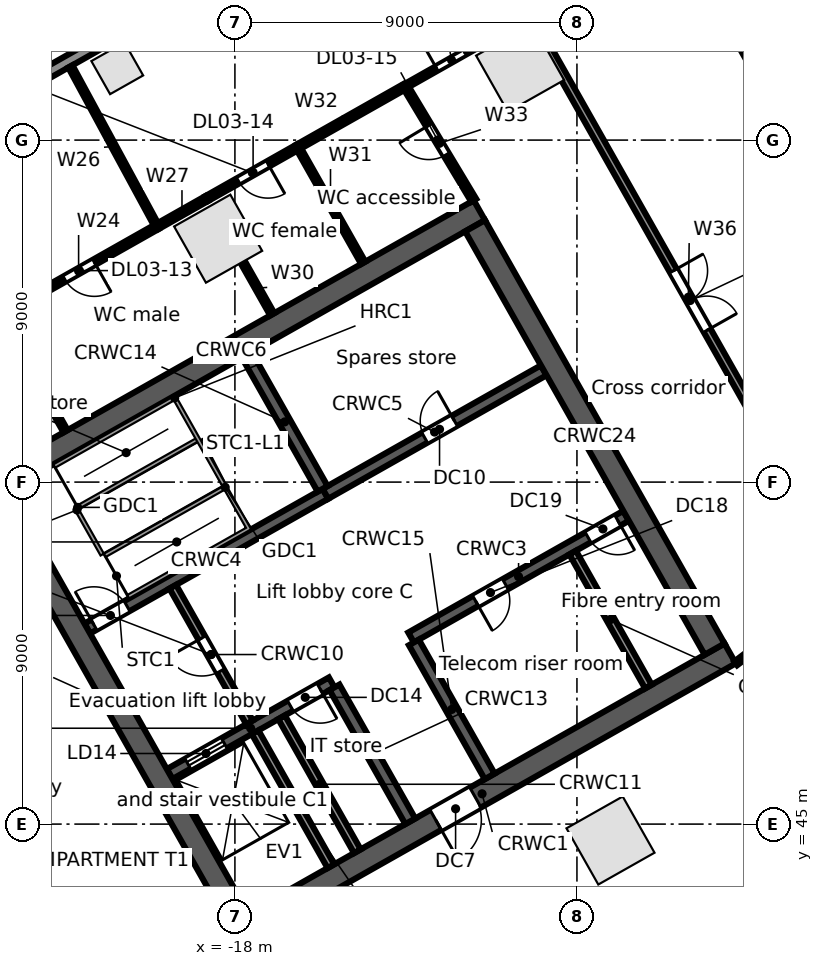
"""IFC4 building model, lengths in metres.
Left out: names, types, materials, properties, quantities, classifications, styles, units other than length and angle.
Written with IfcOpenShell. Run it as: python <this file> out.ifc"""

import sys

from ifc_helpers import new_model, si_unit, direction, frame, frame_2d, origin, origin_2d, place, context, subcontext, project, spatial, rectangle, extrude, element, fill, save


model = new_model("IFC4")
c1 = context("Model", 3, precision=1e-05, world=origin(), true_north=direction((0.0, 1.0)))
c2 = subcontext(c1, "Body", "Model", "MODEL_VIEW")
j1 = project(units=[si_unit("LENGTHUNIT", "METRE"), si_unit("PLANEANGLEUNIT", "RADIAN")], contexts=[c1])
p1 = place(None, origin())
s1 = spatial("IfcSite", under=j1, at=p1, CompositionType="ELEMENT")
p2 = place(p1, origin())
s2 = spatial("IfcBuilding", under=s1, at=p2, CompositionType="ELEMENT")
p3 = place(p2, frame((0.0, 0.0, 16.5)))
s3 = spatial("IfcBuildingStorey", under=s2, at=p3, CompositionType="ELEMENT", Elevation=16.5)
for number, where, z_axis, x_axis in (
    (1, (-10.495, 64.902, 0.0), (0.0, 0.0, 1.0), (-0.87, -0.492, 0.0)),
    (2, (-18.441, 60.406, 0.0), (0.0, 0.0, 1.0), (-0.87, -0.492, 0.0)),
    (3, (-8.117, 44.568, 0.0), (0.0, 0.0, 1.0), (0.87, 0.492, 0.0)),
):
    element("IfcColumn", number, at=place(p3, frame(where, z_axis=z_axis, x_axis=x_axis)), inside=s3, PredefinedType="COLUMN", context=c2, shape_type="SweptSolid", body=[
        extrude(rectangle(XDim=1.7, YDim=1.7, at=origin_2d()), origin(), (0.0, 0.0, 1.0), 5.0),
    ])
p4 = place(p3, frame((-21.096, 64.89, 0.0), z_axis=(0.0, 0.0, 1.0), x_axis=(-0.87035569594, -0.492423560103, 0.0)))
e4 = element("IfcColumn", 4, at=p4, inside=s3, PredefinedType="COLUMN", context=c2, shape_type="SweptSolid", body=[
    extrude(rectangle(XDim=1.0, YDim=1.0, at=origin_2d()), origin(), (0.0, 0.0, 1.0), 5.0),
])
p5 = place(p3, frame((-63.707, 41.701, 0.0), z_axis=(0.0, 0.0, 1.0), x_axis=(0.870355510268, 0.492423888277, 0.0)))
e5 = element("IfcWall", 5, at=p5, inside=s3, PredefinedType="STANDARD", context=c2, shape_type="SweptSolid", body=[
    extrude(rectangle(XDim=67.903, YDim=0.3, at=frame_2d((33.952, 0.0))), origin(), (0.0, 0.0, 1.0), 4.65),
])
p6 = place(p3, frame((-18.024, 42.104, 0.0), z_axis=(0.0, 0.0, 1.0), x_axis=(0.870360574057, 0.492414937962, 0.0)))
e6 = element("IfcWall", 6, at=p6, inside=s3, PredefinedType="SOLIDWALL", context=c2, shape_type="SweptSolid", body=[
    extrude(rectangle(XDim=15.0, YDim=0.6, at=frame_2d((7.5, 0.0))), origin(), (0.0, 0.0, 1.0), 4.65),
])
p7 = place(p6, frame((6.1, 0.0, 0.0)))
e7 = element("IfcOpeningElement", 7, at=p7, cuts=e6, PredefinedType="OPENING", context=c2, shape_type="SweptSolid", body=[
    extrude(rectangle(XDim=1.2, YDim=2.1, at=frame_2d((0.6, 1.05))), frame((0.0, 0.31, 0.0), z_axis=(0.0, -1.0, 0.0), x_axis=(1.0, 0.0, 0.0)), (0.0, 0.0, 1.0), 0.62),
])
p8 = place(p3, frame((-19.718, 46.316, 0.0), z_axis=(0.0, 0.0, 1.0), x_axis=(0.870353963862, 0.492426621528, 0.0)))
e8 = element("IfcWall", 8, at=p8, inside=s3, PredefinedType="SOLIDWALL", context=c2, shape_type="SweptSolid", body=[
    extrude(rectangle(XDim=4.9, YDim=0.3, at=frame_2d((2.45, 0.0))), origin(), (0.0, 0.0, 1.0), 4.65),
])
p9 = place(p8, frame((0.55, 0.0, 0.0)))
e9 = element("IfcOpeningElement", 9, at=p9, cuts=e8, PredefinedType="OPENING", context=c2, shape_type="SweptSolid", body=[
    extrude(rectangle(XDim=1.1, YDim=2.1, at=frame_2d((0.55, 1.05))), frame((0.0, 0.16, 0.0), z_axis=(0.0, -1.0, 0.0), x_axis=(1.0, 0.0, 0.0)), (0.0, 0.0, 1.0), 0.32),
])
p10 = place(p8, frame((3.65, 0.0, 0.0)))
e10 = element("IfcOpeningElement", 10, at=p10, cuts=e8, PredefinedType="OPENING", context=c2, shape_type="SweptSolid", body=[
    extrude(rectangle(XDim=0.9, YDim=2.1, at=frame_2d((0.45, 1.05))), frame((0.0, 0.16, 0.0), z_axis=(0.0, -1.0, 0.0), x_axis=(1.0, 0.0, 0.0)), (0.0, 0.0, 1.0), 0.32),
])
p11 = place(p3, frame((-13.365, 49.911, 0.0), z_axis=(0.0, 0.0, 1.0), x_axis=(0.870340995471, 0.49244954219, 0.0)))
e11 = element("IfcWall", 11, at=p11, inside=s3, PredefinedType="SOLIDWALL", context=c2, shape_type="SweptSolid", body=[
    extrude(rectangle(XDim=6.5, YDim=0.3, at=frame_2d((3.25, 0.0))), origin(), (0.0, 0.0, 1.0), 4.65),
])
p12 = place(p11, frame((1.95, 0.0, 0.0)))
e12 = element("IfcOpeningElement", 12, at=p12, cuts=e11, PredefinedType="OPENING", context=c2, shape_type="SweptSolid", body=[
    extrude(rectangle(XDim=0.9, YDim=2.1, at=frame_2d((0.45, 1.05))), frame((0.0, 0.16, 0.0), z_axis=(0.0, -1.0, 0.0), x_axis=(1.0, 0.0, 0.0)), (0.0, 0.0, 1.0), 0.32),
])
p13 = place(p11, frame((5.35, 0.0, 0.0)))
e13 = element("IfcOpeningElement", 13, at=p13, cuts=e11, PredefinedType="OPENING", context=c2, shape_type="SweptSolid", body=[
    extrude(rectangle(XDim=0.9, YDim=2.1, at=frame_2d((0.45, 1.05))), frame((0.0, 0.16, 0.0), z_axis=(0.0, -1.0, 0.0), x_axis=(1.0, 0.0, 0.0)), (0.0, 0.0, 1.0), 0.32),
])
p14 = place(p3, frame((-21.885, 50.146, 0.0), z_axis=(0.0, 0.0, 1.0), x_axis=(0.870359411463, 0.492416992881, 0.0)))
e14 = element("IfcWall", 14, at=p14, inside=s3, PredefinedType="SOLIDWALL", context=c2, shape_type="SweptSolid", body=[
    extrude(rectangle(XDim=7.2, YDim=0.3, at=frame_2d((3.6, 0.0))), origin(), (0.0, 0.0, 1.0), 4.65),
])
p15 = place(p14, frame((0.2, 0.0, 0.0)))
e15 = element("IfcOpeningElement", 15, at=p15, cuts=e14, PredefinedType="OPENING", context=c2, shape_type="SweptSolid", body=[
    extrude(rectangle(XDim=1.0, YDim=2.1, at=frame_2d((0.5, 1.05))), frame((0.0, 0.16, 0.0), z_axis=(0.0, -1.0, 0.0), x_axis=(1.0, 0.0, 0.0)), (0.0, 0.0, 1.0), 0.32),
])
p16 = place(p3, frame((-15.618, 53.691, 0.0), z_axis=(0.0, 0.0, 1.0), x_axis=(0.870356769198, 0.492421663121, 0.0)))
e16 = element("IfcWall", 16, at=p16, inside=s3, PredefinedType="SOLIDWALL", context=c2, shape_type="SweptSolid", body=[
    extrude(rectangle(XDim=6.6, YDim=0.3, at=frame_2d((3.3, 0.0))), origin(), (0.0, 0.0, 1.0), 4.65),
])
p17 = place(p16, frame((3.0, 0.0, 0.0)))
e17 = element("IfcOpeningElement", 17, at=p17, cuts=e16, PredefinedType="OPENING", context=c2, shape_type="SweptSolid", body=[
    extrude(rectangle(XDim=0.9, YDim=2.1, at=frame_2d((0.45, 1.05))), frame((0.0, 0.16, 0.0), z_axis=(0.0, -1.0, 0.0), x_axis=(1.0, 0.0, 0.0)), (0.0, 0.0, 1.0), 0.32),
])
p18 = place(p3, frame((-24.623, 53.767, 0.0), z_axis=(0.0, 0.0, 1.0), x_axis=(0.870356627484, 0.492421913601, 0.0)))
e18 = element("IfcWall", 18, at=p18, inside=s3, PredefinedType="SOLIDWALL", context=c2, shape_type="SweptSolid", body=[
    extrude(rectangle(XDim=15.0, YDim=0.6, at=frame_2d((7.5, 0.0))), origin(), (0.0, 0.0, 1.0), 4.65),
])
p19 = place(p3, frame((-24.214, 53.654, 0.0), z_axis=(0.0, 0.0, 1.0), x_axis=(0.492441221355, -0.870345703448, 0.0)))
e19 = element("IfcWall", 19, at=p19, inside=s3, PredefinedType="SOLIDWALL", context=c2, shape_type="SweptSolid", body=[
    extrude(rectangle(XDim=12.8, YDim=0.6, at=frame_2d((6.4, 0.0))), origin(), (0.0, 0.0, 1.0), 4.65),
])
p20 = place(p3, frame((-17.469, 47.417, 0.0), z_axis=(0.0, 0.0, 1.0), x_axis=(0.492440575896, -0.870346068648, 0.0)))
e20 = element("IfcWall", 20, at=p20, inside=s3, PredefinedType="SOLIDWALL", context=c2, shape_type="SweptSolid", body=[
    extrude(rectangle(XDim=4.05, YDim=0.2, at=frame_2d((2.025, 0.0))), origin(), (0.0, 0.0, 1.0), 4.65),
])
p21 = place(p3, frame((-19.635, 51.246, 0.0), z_axis=(0.0, 0.0, 1.0), x_axis=(0.492408451753, -0.87036424366, 0.0)))
e21 = element("IfcWall", 21, at=p21, inside=s3, PredefinedType="PARTITIONING", context=c2, shape_type="SweptSolid", body=[
    extrude(rectangle(XDim=4.1, YDim=0.2, at=frame_2d((2.05, 0.0))), origin(), (0.0, 0.0, 1.0), 4.65),
])
p22 = place(p21, frame((1.55, 0.0, 0.0)))
e22 = element("IfcOpeningElement", 22, at=p22, cuts=e21, PredefinedType="OPENING", context=c2, shape_type="SweptSolid", body=[
    extrude(rectangle(XDim=1.0, YDim=2.1, at=frame_2d((0.5, 1.05))), frame((0.0, 0.11, 0.0), z_axis=(0.0, -1.0, 0.0), x_axis=(1.0, 0.0, 0.0)), (0.0, 0.0, 1.0), 0.22),
])
p23 = place(p3, frame((-16.772, 47.811, 0.0), z_axis=(0.0, 0.0, 1.0), x_axis=(0.492440575896, -0.870346068648, 0.0)))
e23 = element("IfcWall", 23, at=p23, inside=s3, PredefinedType="SOLIDWALL", context=c2, shape_type="SweptSolid", body=[
    extrude(rectangle(XDim=4.05, YDim=0.2, at=frame_2d((2.025, 0.0))), origin(), (0.0, 0.0, 1.0), 4.65),
])
p24 = place(p3, frame((-15.379, 48.599, 0.0), z_axis=(0.0, 0.0, 1.0), x_axis=(0.492394910396, -0.870371904542, 0.0)))
e24 = element("IfcWall", 24, at=p24, inside=s3, PredefinedType="SOLIDWALL", context=c2, shape_type="SweptSolid", body=[
    extrude(rectangle(XDim=4.05, YDim=0.3, at=frame_2d((2.025, 0.0))), origin(), (0.0, 0.0, 1.0), 4.65),
])
p25 = place(p3, frame((-17.686, 57.347, 0.0), z_axis=(0.0, 0.0, 1.0), x_axis=(0.492420746998, -0.870357287513, 0.0)))
e25 = element("IfcWall", 25, at=p25, inside=s3, PredefinedType="SOLIDWALL", context=c2, shape_type="SweptSolid", body=[
    extrude(rectangle(XDim=4.05, YDim=0.3, at=frame_2d((2.025, 0.0))), origin(), (0.0, 0.0, 1.0), 4.65),
])
p26 = place(p3, frame((-13.291, 49.781, 0.0), z_axis=(0.0, 0.0, 1.0), x_axis=(0.492394910396, -0.870371904542, 0.0)))
e26 = element("IfcWall", 26, at=p26, inside=s3, PredefinedType="SOLIDWALL", context=c2, shape_type="SweptSolid", body=[
    extrude(rectangle(XDim=4.05, YDim=0.3, at=frame_2d((2.025, 0.0))), origin(), (0.0, 0.0, 1.0), 4.65),
])
p27 = place(p3, frame((-9.113, 52.144, 0.0), z_axis=(0.0, 0.0, 1.0), x_axis=(0.492394910396, -0.870371904542, 0.0)))
e27 = element("IfcWall", 27, at=p27, inside=s3, PredefinedType="PARTITIONING", context=c2, shape_type="SweptSolid", body=[
    extrude(rectangle(XDim=4.05, YDim=0.2, at=frame_2d((2.025, 0.0))), origin(), (0.0, 0.0, 1.0), 4.65),
])
p28 = place(p3, frame((-11.681, 60.744, 0.0), z_axis=(0.0, 0.0, 1.0), x_axis=(0.492426772896, -0.870353878221, 0.0)))
e28 = element("IfcWall", 28, at=p28, inside=s3, PredefinedType="SOLIDWALL", context=c2, shape_type="SweptSolid", body=[
    extrude(rectangle(XDim=12.8, YDim=0.6, at=frame_2d((6.4, 0.0))), origin(), (0.0, 0.0, 1.0), 4.65),
])
p29 = place(p3, frame((-24.18, 58.384, 0.0), z_axis=(0.0, 0.0, 1.0), x_axis=(0.492521469645, -0.870300294116, 0.0)))
e29 = element("IfcWall", 29, at=p29, inside=s3, PredefinedType="PARTITIONING", context=c2, shape_type="SweptSolid", body=[
    extrude(rectangle(XDim=3.5, YDim=0.125, at=frame_2d((1.75, 0.0))), origin(), (0.0, 0.0, 1.0), 3.93),
])
p30 = place(p3, frame((-24.18, 58.384, 0.0), z_axis=(0.0, 0.0, 1.0), x_axis=(0.870360772617, 0.492414587, 0.0)))
e30 = element("IfcWall", 30, at=p30, inside=s3, PredefinedType="PARTITIONING", context=c2, shape_type="SweptSolid", body=[
    extrude(rectangle(XDim=4.75, YDim=0.15, at=frame_2d((2.375, 0.0))), origin(), (0.0, 0.0, 1.0), 4.65),
])
p31 = place(p30, frame((1.95, 0.0, 0.0)))
e31 = element("IfcOpeningElement", 31, at=p31, cuts=e30, PredefinedType="OPENING", context=c2, shape_type="SweptSolid", body=[
    extrude(rectangle(XDim=0.9, YDim=2.1, at=frame_2d((0.45, 1.05))), frame((0.0, 0.085, 0.0), z_axis=(0.0, -1.0, 0.0), x_axis=(1.0, 0.0, 0.0)), (0.0, 0.0, 1.0), 0.17),
])
p32 = place(p3, frame((-22.33, 64.939, 0.0), z_axis=(0.0, 0.0, 1.0), x_axis=(0.476360236723, -0.879250206067, 0.0)))
e32 = element("IfcWall", 32, at=p32, inside=s3, PredefinedType="PARTITIONING", context=c2, shape_type="SweptSolid", body=[
    extrude(rectangle(XDim=4.795, YDim=0.125, at=frame_2d((2.397, 0.0))), origin(), (0.0, 0.0, 1.0), 3.93),
])
p33 = place(p3, frame((-20.046, 60.723, 0.0), z_axis=(0.0, 0.0, 1.0), x_axis=(0.870308175411, 0.492507542899, 0.0)))
e33 = element("IfcWall", 33, at=p33, inside=s3, PredefinedType="PARTITIONING", context=c2, shape_type="SweptSolid", body=[
    extrude(rectangle(XDim=1.5, YDim=0.15, at=frame_2d((0.75, 0.0))), origin(), (0.0, 0.0, 1.0), 3.93),
])
p34 = place(p3, frame((-18.74, 61.462, 0.0), z_axis=(0.0, 0.0, 1.0), x_axis=(0.870430549821, 0.492291232848, 0.0)))
e34 = element("IfcWall", 34, at=p34, inside=s3, PredefinedType="PARTITIONING", context=c2, shape_type="SweptSolid", body=[
    extrude(rectangle(XDim=2.75, YDim=0.15, at=frame_2d((1.375, 0.0))), origin(), (0.0, 0.0, 1.0), 4.65),
])
p35 = place(p34, frame((0.95, 0.0, 0.0)))
e35 = element("IfcOpeningElement", 35, at=p35, cuts=e34, PredefinedType="OPENING", context=c2, shape_type="SweptSolid", body=[
    extrude(rectangle(XDim=0.9, YDim=2.1, at=frame_2d((0.45, 1.05))), frame((0.0, 0.085, 0.0), z_axis=(0.0, -1.0, 0.0), x_axis=(1.0, 0.0, 0.0)), (0.0, 0.0, 1.0), 0.17),
])
p36 = place(p3, frame((-17.797, 59.794, 0.0), z_axis=(0.0, 0.0, 1.0), x_axis=(0.492366981934, -0.870387703901, 0.0)))
e36 = element("IfcWall", 36, at=p36, inside=s3, PredefinedType="PARTITIONING", context=c2, shape_type="SweptSolid", body=[
    extrude(rectangle(XDim=1.584, YDim=0.125, at=frame_2d((0.792, 0.0))), origin(), (0.0, 0.0, 1.0), 4.65),
])
p37 = place(p3, frame((-16.346, 62.816, 0.0), z_axis=(0.0, 0.0, 1.0), x_axis=(0.492220429283, -0.870470590541, 0.0)))
e37 = element("IfcWall", 37, at=p37, inside=s3, PredefinedType="PARTITIONING", context=c2, shape_type="SweptSolid", body=[
    extrude(rectangle(XDim=3.5, YDim=0.125, at=frame_2d((1.75, 0.0))), origin(), (0.0, 0.0, 1.0), 3.93),
])
p38 = place(p3, frame((-16.346, 62.816, 0.0), z_axis=(0.0, 0.0, 1.0), x_axis=(0.870334637055, 0.492460779699, 0.0)))
e38 = element("IfcWall", 38, at=p38, inside=s3, PredefinedType="PARTITIONING", context=c2, shape_type="SweptSolid", body=[
    extrude(rectangle(XDim=3.249, YDim=0.15, at=frame_2d((1.625, 0.0))), origin(), (0.0, 0.0, 1.0), 4.65),
])
p39 = place(p3, frame((-13.518, 64.416, 0.0), z_axis=(0.0, 0.0, 1.0), x_axis=(0.514875058642, -0.857265229663, 0.0)))
e39 = element("IfcWall", 39, at=p39, inside=s3, PredefinedType="PARTITIONING", context=c2, shape_type="SweptSolid", body=[
    extrude(rectangle(XDim=3.502, YDim=0.15, at=frame_2d((1.751, 0.0))), origin(), (0.0, 0.0, 1.0), 3.93),
])
p40 = place(p39, frame((1.2, 0.0, 0.0)))
e40 = element("IfcOpeningElement", 40, at=p40, cuts=e39, PredefinedType="OPENING", context=c2, shape_type="SweptSolid", body=[
    extrude(rectangle(XDim=0.9, YDim=2.1, at=frame_2d((0.45, 1.05))), frame((0.0, 0.085, 0.0), z_axis=(0.0, -1.0, 0.0), x_axis=(1.0, 0.0, 0.0)), (0.0, 0.0, 1.0), 0.17),
])
p41 = place(p3, frame((-13.518, 64.416, 0.0), z_axis=(0.0, 0.0, 1.0), x_axis=(0.870338454914, 0.492454032268, 0.0)))
e41 = element("IfcWall", 41, at=p41, inside=s3, PredefinedType="PARTITIONING", context=c2, shape_type="SweptSolid", body=[
    extrude(rectangle(XDim=3.75, YDim=0.125, at=frame_2d((1.875, 0.0))), origin(), (0.0, 0.0, 1.0), 3.712),
])
p42 = place(p41, frame((0.95, 0.0, 0.0)))
e42 = element("IfcOpeningElement", 42, at=p42, cuts=e41, PredefinedType="OPENING", context=c2, shape_type="SweptSolid", body=[
    extrude(rectangle(XDim=0.9, YDim=2.1, at=frame_2d((0.45, 1.05))), frame((0.0, 0.073, 0.0), z_axis=(0.0, -1.0, 0.0), x_axis=(1.0, 0.0, 0.0)), (0.0, 0.0, 1.0), 0.145),
])
p43 = place(p3, frame((-10.254, 66.263, 0.0), z_axis=(0.0, 0.0, 1.0), x_axis=(0.492411664329, -0.870362426138, 0.0)))
e43 = element("IfcWall", 43, at=p43, inside=s3, PredefinedType="PARTITIONING", context=c2, shape_type="SweptSolid", body=[
    extrude(rectangle(XDim=17.0, YDim=0.2, at=frame_2d((8.5, 0.0))), origin(), (0.0, 0.0, 1.0), 3.712),
])
p44 = place(p43, frame((7.7, 0.0, 0.0)))
e44 = element("IfcOpeningElement", 44, at=p44, cuts=e43, PredefinedType="OPENING", context=c2, shape_type="SweptSolid", body=[
    extrude(rectangle(XDim=1.8, YDim=2.1, at=frame_2d((0.9, 1.05))), frame((0.0, 0.11, 0.0), z_axis=(0.0, -1.0, 0.0), x_axis=(1.0, 0.0, 0.0)), (0.0, 0.0, 1.0), 0.22),
])
p45 = place(p3, frame((-6.337, 68.478, 0.0), z_axis=(0.0, 0.0, 1.0), x_axis=(0.492412602502, -0.870361895361, 0.0)))
e45 = element("IfcWall", 45, at=p45, inside=s3, PredefinedType="PARTITIONING", context=c2, shape_type="SweptSolid", body=[
    extrude(rectangle(XDim=9.417, YDim=0.2, at=frame_2d((4.708, 0.0))), origin(), (0.0, 0.0, 1.0), 3.712),
])
p46 = place(p3, frame((-4.821, 49.23, 0.0), z_axis=(0.0, 0.0, 1.0), x_axis=(0.795615322848, 0.605802160816, 0.0)))
e46 = element("IfcWall", 46, at=p46, inside=s3, PredefinedType="PARTITIONING", context=c2, shape_type="SweptSolid", body=[
    extrude(rectangle(XDim=3.693, YDim=0.125, at=frame_2d((1.846, 0.0))), origin(), (0.0, 0.0, 1.0), 4.65),
])
p47 = place(p46, frame((1.45, 0.0, 0.0)))
e47 = element("IfcOpeningElement", 47, at=p47, cuts=e46, PredefinedType="OPENING", context=c2, shape_type="SweptSolid", body=[
    extrude(rectangle(XDim=0.9, YDim=2.1, at=frame_2d((0.45, 1.05))), frame((0.0, 0.073, 0.0), z_axis=(0.0, -1.0, 0.0), x_axis=(1.0, 0.0, 0.0)), (0.0, 0.0, 1.0), 0.145),
])
p48 = place(p9, origin())
e48 = element("IfcDoor", 48, at=p48, inside=s3, OperationType="DOUBLE_DOOR_SLIDING", PredefinedType="DOOR", context=c2, shape_type="SweptSolid", body=[
    extrude(rectangle(XDim=1.1, YDim=2.1, at=frame_2d((0.55, 1.05))), frame((0.0, 0.025, 0.0), z_axis=(0.0, -1.0, 0.0), x_axis=(1.0, 0.0, 0.0)), (0.0, 0.0, 1.0), 0.05),
])
fill(e9, e48)
p49 = place(p15, origin())
e49 = element("IfcDoor", 49, at=p49, inside=s3, OperationType="SINGLE_SWING_LEFT", PredefinedType="DOOR", context=c2, shape_type="SweptSolid", body=[
    extrude(rectangle(XDim=1.0, YDim=2.1, at=frame_2d((0.5, 1.05))), frame((0.0, 0.025, 0.0), z_axis=(0.0, -1.0, 0.0), x_axis=(1.0, 0.0, 0.0)), (0.0, 0.0, 1.0), 0.05),
])
fill(e15, e49)
p50 = place(p22, frame((1.0, 0.0, 0.0), z_axis=(0.0, 0.0, 1.0), x_axis=(-1.0, 0.0, 0.0)))
e50 = element("IfcDoor", 50, at=p50, inside=s3, OperationType="SINGLE_SWING_RIGHT", PredefinedType="DOOR", context=c2, shape_type="SweptSolid", body=[
    extrude(rectangle(XDim=1.0, YDim=2.1, at=frame_2d((0.5, 1.05))), frame((0.0, 0.025, 0.0), z_axis=(0.0, -1.0, 0.0), x_axis=(1.0, 0.0, 0.0)), (0.0, 0.0, 1.0), 0.05),
])
fill(e22, e50)
p51 = place(p7, frame((1.2, 0.0, 0.0), z_axis=(0.0, 0.0, 1.0), x_axis=(-1.0, 0.0, 0.0)))
e51 = element("IfcDoor", 51, at=p51, inside=s3, OperationType="SINGLE_SWING_RIGHT", PredefinedType="DOOR", context=c2, shape_type="SweptSolid", body=[
    extrude(rectangle(XDim=1.2, YDim=2.1, at=frame_2d((0.6, 1.05))), frame((0.0, 0.025, 0.0), z_axis=(0.0, -1.0, 0.0), x_axis=(1.0, 0.0, 0.0)), (0.0, 0.0, 1.0), 0.05),
])
fill(e7, e51)
p52 = place(p17, origin())
e52 = element("IfcDoor", 52, at=p52, inside=s3, OperationType="SINGLE_SWING_RIGHT", PredefinedType="DOOR", context=c2, shape_type="SweptSolid", body=[
    extrude(rectangle(XDim=0.9, YDim=2.1, at=frame_2d((0.45, 1.05))), frame((0.0, 0.025, 0.0), z_axis=(0.0, -1.0, 0.0), x_axis=(1.0, 0.0, 0.0)), (0.0, 0.0, 1.0), 0.05),
])
fill(e17, e52)
p53 = place(p10, frame((0.9, 0.0, 0.0), z_axis=(0.0, 0.0, 1.0), x_axis=(-1.0, 0.0, 0.0)))
e53 = element("IfcDoor", 53, at=p53, inside=s3, OperationType="SINGLE_SWING_LEFT", PredefinedType="DOOR", context=c2, shape_type="SweptSolid", body=[
    extrude(rectangle(XDim=0.9, YDim=2.1, at=frame_2d((0.45, 1.05))), frame((0.0, 0.025, 0.0), z_axis=(0.0, -1.0, 0.0), x_axis=(1.0, 0.0, 0.0)), (0.0, 0.0, 1.0), 0.05),
])
fill(e10, e53)
p54 = place(p12, frame((0.9, 0.0, 0.0), z_axis=(0.0, 0.0, 1.0), x_axis=(-1.0, 0.0, 0.0)))
e54 = element("IfcDoor", 54, at=p54, inside=s3, OperationType="SINGLE_SWING_RIGHT", PredefinedType="DOOR", context=c2, shape_type="SweptSolid", body=[
    extrude(rectangle(XDim=0.9, YDim=2.1, at=frame_2d((0.45, 1.05))), frame((0.0, 0.025, 0.0), z_axis=(0.0, -1.0, 0.0), x_axis=(1.0, 0.0, 0.0)), (0.0, 0.0, 1.0), 0.05),
])
fill(e12, e54)
p55 = place(p13, frame((0.9, 0.0, 0.0), z_axis=(0.0, 0.0, 1.0), x_axis=(-1.0, 0.0, 0.0)))
e55 = element("IfcDoor", 55, at=p55, inside=s3, OperationType="SINGLE_SWING_LEFT", PredefinedType="DOOR", context=c2, shape_type="SweptSolid", body=[
    extrude(rectangle(XDim=0.9, YDim=2.1, at=frame_2d((0.45, 1.05))), frame((0.0, 0.025, 0.0), z_axis=(0.0, -1.0, 0.0), x_axis=(1.0, 0.0, 0.0)), (0.0, 0.0, 1.0), 0.05),
])
fill(e13, e55)
p56 = place(p42, origin())
e56 = element("IfcDoor", 56, at=p56, inside=s3, OperationType="SINGLE_SWING_LEFT", PredefinedType="DOOR", context=c2, shape_type="SweptSolid", body=[
    extrude(rectangle(XDim=0.9, YDim=2.1, at=frame_2d((0.45, 1.05))), frame((0.0, 0.025, 0.0), z_axis=(0.0, -1.0, 0.0), x_axis=(1.0, 0.0, 0.0)), (0.0, 0.0, 1.0), 0.05),
])
fill(e42, e56)
p57 = place(p44, origin())
e57 = element("IfcDoor", 57, at=p57, inside=s3, OperationType="DOUBLE_DOOR_SINGLE_SWING", PredefinedType="DOOR", context=c2, shape_type="SweptSolid", body=[
    extrude(rectangle(XDim=1.8, YDim=2.1, at=frame_2d((0.9, 1.05))), frame((0.0, 0.025, 0.0), z_axis=(0.0, -1.0, 0.0), x_axis=(1.0, 0.0, 0.0)), (0.0, 0.0, 1.0), 0.05),
])
fill(e44, e57)
p58 = place(p31, frame((0.9, 0.0, 0.0), z_axis=(0.0, 0.0, 1.0), x_axis=(-1.0, 0.0, 0.0)))
e58 = element("IfcDoor", 58, at=p58, inside=s3, OperationType="SINGLE_SWING_LEFT", PredefinedType="DOOR", context=c2, shape_type="SweptSolid", body=[
    extrude(rectangle(XDim=0.9, YDim=2.1, at=frame_2d((0.45, 1.05))), frame((0.0, 0.025, 0.0), z_axis=(0.0, -1.0, 0.0), x_axis=(1.0, 0.0, 0.0)), (0.0, 0.0, 1.0), 0.05),
])
fill(e31, e58)
p59 = place(p35, frame((0.9, 0.0, 0.0), z_axis=(0.0, 0.0, 1.0), x_axis=(-1.0, 0.0, 0.0)))
e59 = element("IfcDoor", 59, at=p59, inside=s3, OperationType="SINGLE_SWING_LEFT", PredefinedType="DOOR", context=c2, shape_type="SweptSolid", body=[
    extrude(rectangle(XDim=0.9, YDim=2.1, at=frame_2d((0.45, 1.05))), frame((0.0, 0.025, 0.0), z_axis=(0.0, -1.0, 0.0), x_axis=(1.0, 0.0, 0.0)), (0.0, 0.0, 1.0), 0.05),
])
fill(e35, e59)
p60 = place(p40, frame((0.9, 0.0, 0.0), z_axis=(0.0, 0.0, 1.0), x_axis=(-1.0, 0.0, 0.0)))
e60 = element("IfcDoor", 60, at=p60, inside=s3, OperationType="SINGLE_SWING_RIGHT", PredefinedType="DOOR", context=c2, shape_type="SweptSolid", body=[
    extrude(rectangle(XDim=0.9, YDim=2.1, at=frame_2d((0.45, 1.05))), frame((0.0, 0.025, 0.0), z_axis=(0.0, -1.0, 0.0), x_axis=(1.0, 0.0, 0.0)), (0.0, 0.0, 1.0), 0.05),
])
fill(e40, e60)
save(model, sys.argv[1])
